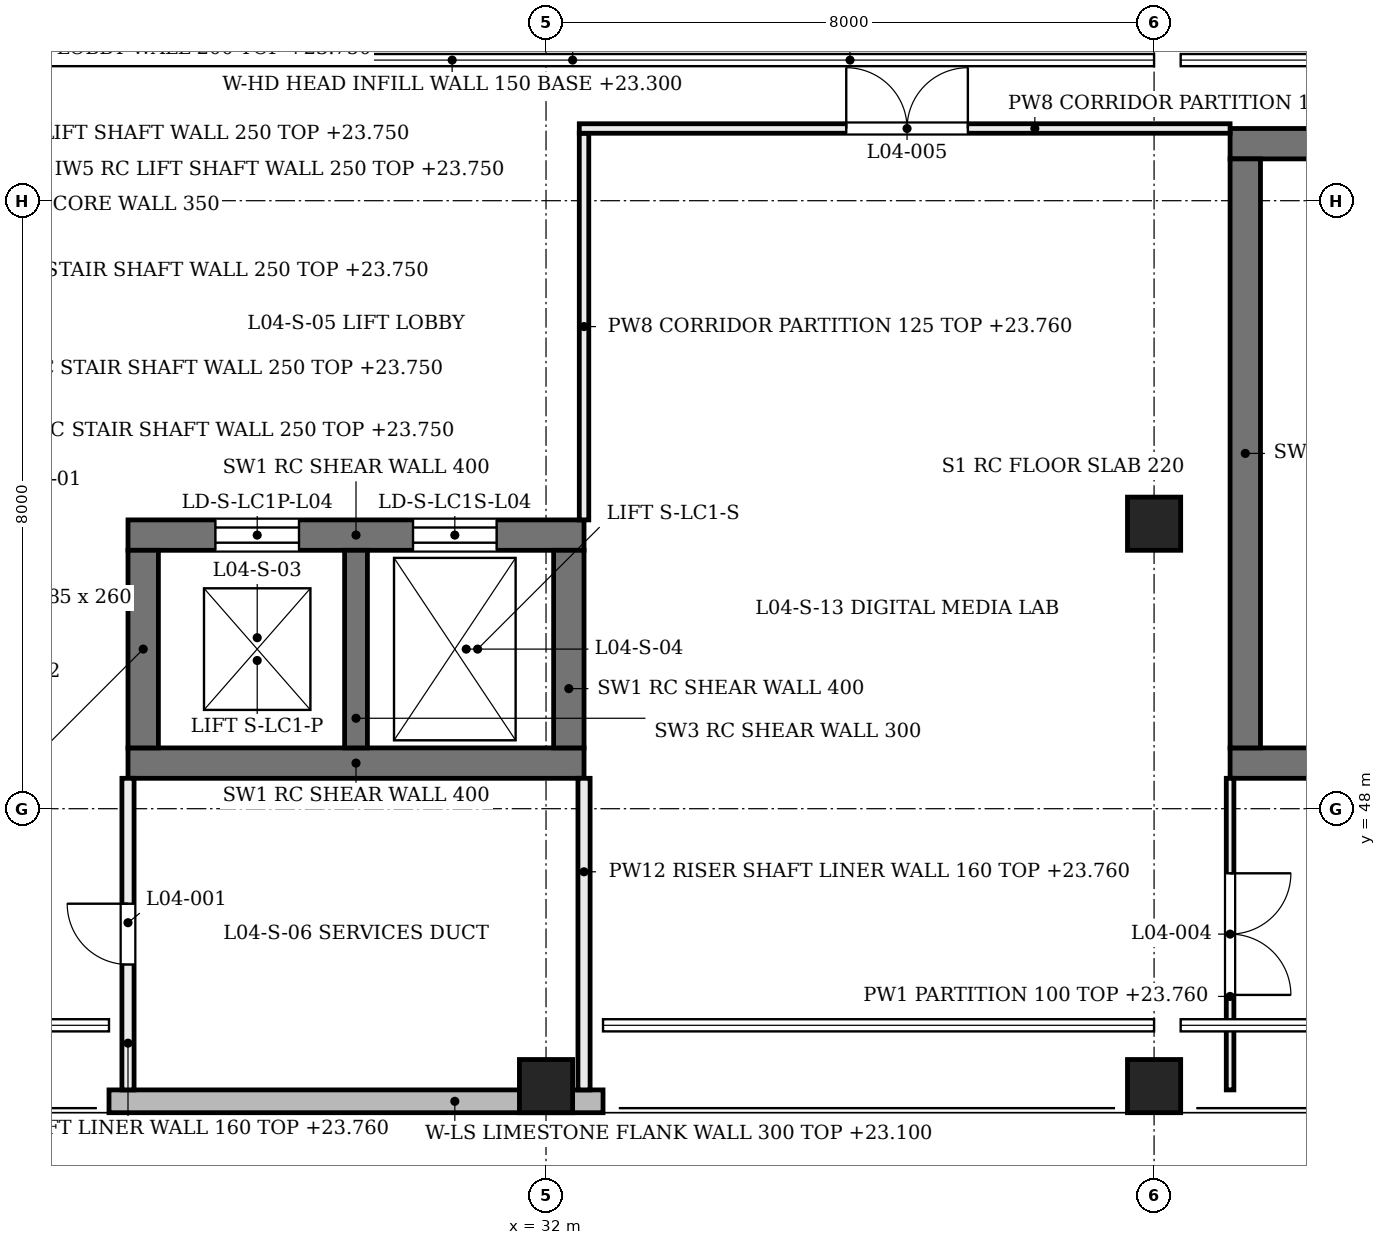
"""IFC4 building model, lengths in metres.
Left out: names, types, materials, properties, quantities, classifications, styles, units other than length and angle.
Written with IfcOpenShell. Run it as: python <this file> out.ifc"""

import sys

from ifc_helpers import new_model, si_unit, direction, frame, frame_2d, origin, origin_2d, place, context, subcontext, project, spatial, rectangle, extrude, element, fill, save


model = new_model("IFC4")
c1 = context("Model", 3, precision=1e-05, world=origin(), true_north=direction((0.0, 1.0)))
c2 = subcontext(c1, "Body", "Model", "MODEL_VIEW")
j1 = project(units=[si_unit("LENGTHUNIT", "METRE"), si_unit("PLANEANGLEUNIT", "RADIAN")], contexts=[c1])
p1 = place(None, origin())
s1 = spatial("IfcSite", under=j1, at=p1, CompositionType="ELEMENT")
p2 = place(p1, origin())
s2 = spatial("IfcBuilding", under=s1, at=p2, CompositionType="ELEMENT")
p3 = place(p2, frame((0.0, 0.0, 19.2)))
s3 = spatial("IfcBuildingStorey", under=s2, at=p3, CompositionType="ELEMENT", Elevation=19.2)
p4 = place(p3, frame((26.5, 48.6, 0.0), z_axis=(0.0, 0.0, 1.0), x_axis=(1.0, 0.0, 0.0)))
e1 = element("IfcWall", 1, at=p4, inside=s3, PredefinedType="SHEAR", context=c2, shape_type="SweptSolid", body=[
    extrude(rectangle(XDim=6.0, YDim=0.4, at=frame_2d((3.0, 0.0))), origin(), (0.0, 0.0, 1.0), 4.58),
])
p5 = place(p3, frame((26.5, 51.6, 0.0), z_axis=(0.0, 0.0, 1.0), x_axis=(1.0, 0.0, 0.0)))
e2 = element("IfcWall", 2, at=p5, inside=s3, PredefinedType="SHEAR", context=c2, shape_type="SweptSolid", body=[
    extrude(rectangle(XDim=6.0, YDim=0.4, at=frame_2d((3.0, 0.0))), origin(), (0.0, 0.0, 1.0), 4.58),
])
p6 = place(p5, frame((1.15, 0.0, 0.0)))
e3 = element("IfcOpeningElement", 3, at=p6, cuts=e2, PredefinedType="OPENING", context=c2, shape_type="SweptSolid", body=[
    extrude(rectangle(XDim=1.1, YDim=2.1, at=frame_2d((0.55, 1.05))), frame((0.0, 0.21, 0.0), z_axis=(0.0, -1.0, 0.0), x_axis=(1.0, 0.0, 0.0)), (0.0, 0.0, 1.0), 0.42),
])
p7 = place(p5, frame((3.75, 0.0, 0.0)))
e4 = element("IfcOpeningElement", 4, at=p7, cuts=e2, PredefinedType="OPENING", context=c2, shape_type="SweptSolid", body=[
    extrude(rectangle(XDim=1.1, YDim=2.1, at=frame_2d((0.55, 1.05))), frame((0.0, 0.21, 0.0), z_axis=(0.0, -1.0, 0.0), x_axis=(1.0, 0.0, 0.0)), (0.0, 0.0, 1.0), 0.42),
])
for number, where, z_axis, x_axis in (
    (5, (26.7, 48.8, 0.0), (0.0, 0.0, 1.0), (0.0, 1.0, 0.0)),
    (6, (32.3, 48.8, 0.0), (0.0, 0.0, 1.0), (0.0, 1.0, 0.0)),
):
    element("IfcWall", number, at=place(p3, frame(where, z_axis=z_axis, x_axis=x_axis)), inside=s3, PredefinedType="SHEAR", context=c2, shape_type="SweptSolid", body=[
        extrude(rectangle(XDim=2.6, YDim=0.4, at=frame_2d((1.3, 0.0))), origin(), (0.0, 0.0, 1.0), 4.58),
    ])
p8 = place(p3, frame((29.5, 48.8, 0.0), z_axis=(0.0, 0.0, 1.0), x_axis=(0.0, 1.0, 0.0)))
e7 = element("IfcWall", 7, at=p8, inside=s3, PredefinedType="SHEAR", context=c2, shape_type="SweptSolid", body=[
    extrude(rectangle(XDim=2.6, YDim=0.3, at=frame_2d((1.3, 0.0))), origin(), (0.0, 0.0, 1.0), 4.58),
])
p9 = place(p3, frame((41.0, 48.6, 0.0), z_axis=(0.0, 0.0, 1.0), x_axis=(1.0, 0.0, 0.0)))
e8 = element("IfcWall", 8, at=p9, inside=s3, PredefinedType="SHEAR", context=c2, shape_type="SweptSolid", body=[
    extrude(rectangle(XDim=22.0, YDim=0.4, at=frame_2d((11.0, 0.0))), origin(), (0.0, 0.0, 1.0), 4.58),
])
p10 = place(p3, frame((41.0, 56.75, 0.0), z_axis=(0.0, 0.0, 1.0), x_axis=(1.0, 0.0, 0.0)))
e9 = element("IfcWall", 9, at=p10, inside=s3, PredefinedType="SHEAR", context=c2, shape_type="SweptSolid", body=[
    extrude(rectangle(XDim=22.0, YDim=0.4, at=frame_2d((11.0, 0.0))), origin(), (0.0, 0.0, 1.0), 4.58),
])
p11 = place(p10, frame((10.366, 0.0, 0.0)))
e10 = element("IfcOpeningElement", 10, at=p11, cuts=e9, PredefinedType="OPENING", context=c2, shape_type="SweptSolid", body=[
    extrude(rectangle(XDim=1.5, YDim=2.1, at=frame_2d((0.75, 1.05))), frame((0.0, 0.21, 0.0), z_axis=(0.0, -1.0, 0.0), x_axis=(1.0, 0.0, 0.0)), (0.0, 0.0, 1.0), 0.42),
])
p12 = place(p3, frame((41.2, 48.8, 0.0), z_axis=(0.0, 0.0, 1.0), x_axis=(0.0, 1.0, 0.0)))
e11 = element("IfcWall", 11, at=p12, inside=s3, PredefinedType="SHEAR", context=c2, shape_type="SweptSolid", body=[
    extrude(rectangle(XDim=7.75, YDim=0.4, at=frame_2d((3.875, 0.0))), origin(), (0.0, 0.0, 1.0), 4.58),
])
for number, where, z_axis, x_axis in (
    (12, (32.0, 44.6, 0.0), (0.0, -0.204, 0.979), (1.0, 0.0, 0.0)),
    (13, (40.0, 44.6, 0.0), (0.0, -0.204, 0.979), (1.0, 0.0, 0.0)),
    (14, (40.0, 52.0, 0.0), (0.0, -0.204, 0.979), (1.0, 0.0, 0.0)),
):
    element("IfcColumn", number, at=place(p3, frame(where, z_axis=z_axis, x_axis=x_axis)), inside=s3, PredefinedType="COLUMN", context=c2, shape_type="SweptSolid", body=[
        extrude(rectangle(XDim=0.7, YDim=0.7, at=origin_2d()), origin(), (0.0, 0.0, 1.0), 4.903),
    ])
p13 = place(p3, frame((26.25, 44.15, 0.0), z_axis=(0.0, 0.0, 1.0), x_axis=(1.0, 0.0, 0.0)))
e15 = element("IfcWall", 15, at=p13, inside=s3, PredefinedType="SOLIDWALL", context=c2, shape_type="SweptSolid", body=[
    extrude(rectangle(XDim=6.5, YDim=0.3, at=frame_2d((3.25, 0.0))), origin(), (0.0, 0.0, 1.0), 3.9),
])
p14 = place(p3, frame((24.9, 57.85, 4.1), z_axis=(0.0, 0.0, 1.0), x_axis=(1.0, 0.0, 0.0)))
e16 = element("IfcWall", 16, at=p14, inside=s3, PredefinedType="SOLIDWALL", context=c2, shape_type="SweptSolid", body=[
    extrude(rectangle(XDim=6.9, YDim=0.15, at=frame_2d((3.45, 0.0))), origin(), (0.0, 0.0, 1.0), 0.48),
])
p15 = place(p3, frame((32.2, 57.85, 4.1), z_axis=(0.0, 0.0, 1.0), x_axis=(1.0, 0.0, 0.0)))
e17 = element("IfcWall", 17, at=p15, inside=s3, PredefinedType="SOLIDWALL", context=c2, shape_type="SweptSolid", body=[
    extrude(rectangle(XDim=7.6, YDim=0.15, at=frame_2d((3.8, 0.0))), origin(), (0.0, 0.0, 1.0), 0.48),
])
p16 = place(p3, frame((26.5, 44.3, 0.0), z_axis=(0.0, 0.0, 1.0), x_axis=(0.0, 1.0, 0.0)))
e18 = element("IfcWall", 18, at=p16, inside=s3, PredefinedType="PARTITIONING", context=c2, shape_type="SweptSolid", body=[
    extrude(rectangle(XDim=4.1, YDim=0.16, at=frame_2d((2.05, 0.0))), origin(), (0.0, 0.0, 1.0), 4.56),
])
p17 = place(p16, frame((1.65, 0.0, 0.0)))
e19 = element("IfcOpeningElement", 19, at=p17, cuts=e18, PredefinedType="OPENING", context=c2, shape_type="SweptSolid", body=[
    extrude(rectangle(XDim=0.8, YDim=2.1, at=frame_2d((0.4, 1.05))), frame((0.0, 0.09, 0.0), z_axis=(0.0, -1.0, 0.0), x_axis=(1.0, 0.0, 0.0)), (0.0, 0.0, 1.0), 0.18),
])
p18 = place(p3, frame((32.5, 44.3, 0.0), z_axis=(0.0, 0.0, 1.0), x_axis=(0.0, 1.0, 0.0)))
e20 = element("IfcWall", 20, at=p18, inside=s3, PredefinedType="PARTITIONING", context=c2, shape_type="SweptSolid", body=[
    extrude(rectangle(XDim=4.1, YDim=0.16, at=frame_2d((2.05, 0.0))), origin(), (0.0, 0.0, 1.0), 4.56),
])
p19 = place(p3, frame((32.5, 51.8, 0.0), z_axis=(0.0, 0.0, 1.0), x_axis=(0.0, 1.0, 0.0)))
e21 = element("IfcWall", 21, at=p19, inside=s3, PredefinedType="PARTITIONING", context=c2, shape_type="SweptSolid", body=[
    extrude(rectangle(XDim=5.087, YDim=0.125, at=frame_2d((2.544, 0.0))), origin(), (0.0, 0.0, 1.0), 4.56),
])
p20 = place(p3, frame((41.0, 44.3, 0.0), z_axis=(0.0, 0.0, 1.0), x_axis=(0.0, 1.0, 0.0)))
e22 = element("IfcWall", 22, at=p20, inside=s3, PredefinedType="PARTITIONING", context=c2, shape_type="SweptSolid", body=[
    extrude(rectangle(XDim=4.1, YDim=0.1, at=frame_2d((2.05, 0.0))), origin(), (0.0, 0.0, 1.0), 4.56),
])
p21 = place(p20, frame((1.25, 0.0, 0.0)))
e23 = element("IfcOpeningElement", 23, at=p21, cuts=e22, PredefinedType="OPENING", context=c2, shape_type="SweptSolid", body=[
    extrude(rectangle(XDim=1.6, YDim=2.2, at=frame_2d((0.8, 1.1))), frame((0.0, 0.06, 0.0), z_axis=(0.0, -1.0, 0.0), x_axis=(1.0, 0.0, 0.0)), (0.0, 0.0, 1.0), 0.12),
])
p22 = place(p3, frame((32.438, 56.95, 0.0), z_axis=(0.0, 0.0, 1.0), x_axis=(1.0, 0.0, 0.0)))
e24 = element("IfcWall", 24, at=p22, inside=s3, PredefinedType="PARTITIONING", context=c2, shape_type="SweptSolid", body=[
    extrude(rectangle(XDim=8.562, YDim=0.125, at=frame_2d((4.281, 0.0))), origin(), (0.0, 0.0, 1.0), 3.98),
])
p23 = place(p22, frame((3.512, 0.0, 0.0)))
e25 = element("IfcOpeningElement", 25, at=p23, cuts=e24, PredefinedType="OPENING", context=c2, shape_type="SweptSolid", body=[
    extrude(rectangle(XDim=1.6, YDim=2.2, at=frame_2d((0.8, 1.1))), frame((0.0, 0.073, 0.0), z_axis=(0.0, -1.0, 0.0), x_axis=(1.0, 0.0, 0.0)), (0.0, 0.0, 1.0), 0.145),
])
p24 = place(p6, origin())
e26 = element("IfcDoor", 26, at=p24, inside=s3, OperationType="DOUBLE_DOOR_SLIDING", PredefinedType="DOOR", context=c2, shape_type="SweptSolid", body=[
    extrude(rectangle(XDim=1.1, YDim=2.1, at=frame_2d((0.55, 1.05))), frame((0.0, 0.025, 0.0), z_axis=(0.0, -1.0, 0.0), x_axis=(1.0, 0.0, 0.0)), (0.0, 0.0, 1.0), 0.05),
])
fill(e3, e26)
p25 = place(p7, origin())
e27 = element("IfcDoor", 27, at=p25, inside=s3, OperationType="DOUBLE_DOOR_SLIDING", PredefinedType="DOOR", context=c2, shape_type="SweptSolid", body=[
    extrude(rectangle(XDim=1.1, YDim=2.1, at=frame_2d((0.55, 1.05))), frame((0.0, 0.025, 0.0), z_axis=(0.0, -1.0, 0.0), x_axis=(1.0, 0.0, 0.0)), (0.0, 0.0, 1.0), 0.05),
])
fill(e4, e27)
p26 = place(p17, frame((0.8, 0.0, 0.0), z_axis=(0.0, 0.0, 1.0), x_axis=(-1.0, 0.0, 0.0)))
e28 = element("IfcDoor", 28, at=p26, inside=s3, OperationType="SINGLE_SWING_RIGHT", PredefinedType="DOOR", context=c2, shape_type="SweptSolid", body=[
    extrude(rectangle(XDim=0.8, YDim=2.1, at=frame_2d((0.4, 1.05))), frame((0.0, 0.025, 0.0), z_axis=(0.0, -1.0, 0.0), x_axis=(1.0, 0.0, 0.0)), (0.0, 0.0, 1.0), 0.05),
])
fill(e19, e28)
p27 = place(p21, frame((1.6, 0.0, 0.0), z_axis=(0.0, 0.0, 1.0), x_axis=(-1.0, 0.0, 0.0)))
e29 = element("IfcDoor", 29, at=p27, inside=s3, OperationType="DOUBLE_DOOR_SINGLE_SWING", PredefinedType="DOOR", context=c2, shape_type="SweptSolid", body=[
    extrude(rectangle(XDim=1.6, YDim=2.2, at=frame_2d((0.8, 1.1))), frame((0.0, 0.025, 0.0), z_axis=(0.0, -1.0, 0.0), x_axis=(1.0, 0.0, 0.0)), (0.0, 0.0, 1.0), 0.05),
])
fill(e23, e29)
p28 = place(p23, origin())
e30 = element("IfcDoor", 30, at=p28, inside=s3, OperationType="DOUBLE_DOOR_SINGLE_SWING", PredefinedType="DOOR", context=c2, shape_type="SweptSolid", body=[
    extrude(rectangle(XDim=1.6, YDim=2.2, at=frame_2d((0.8, 1.1))), frame((0.0, 0.025, 0.0), z_axis=(0.0, -1.0, 0.0), x_axis=(1.0, 0.0, 0.0)), (0.0, 0.0, 1.0), 0.05),
])
fill(e25, e30)
save(model, sys.argv[1])
